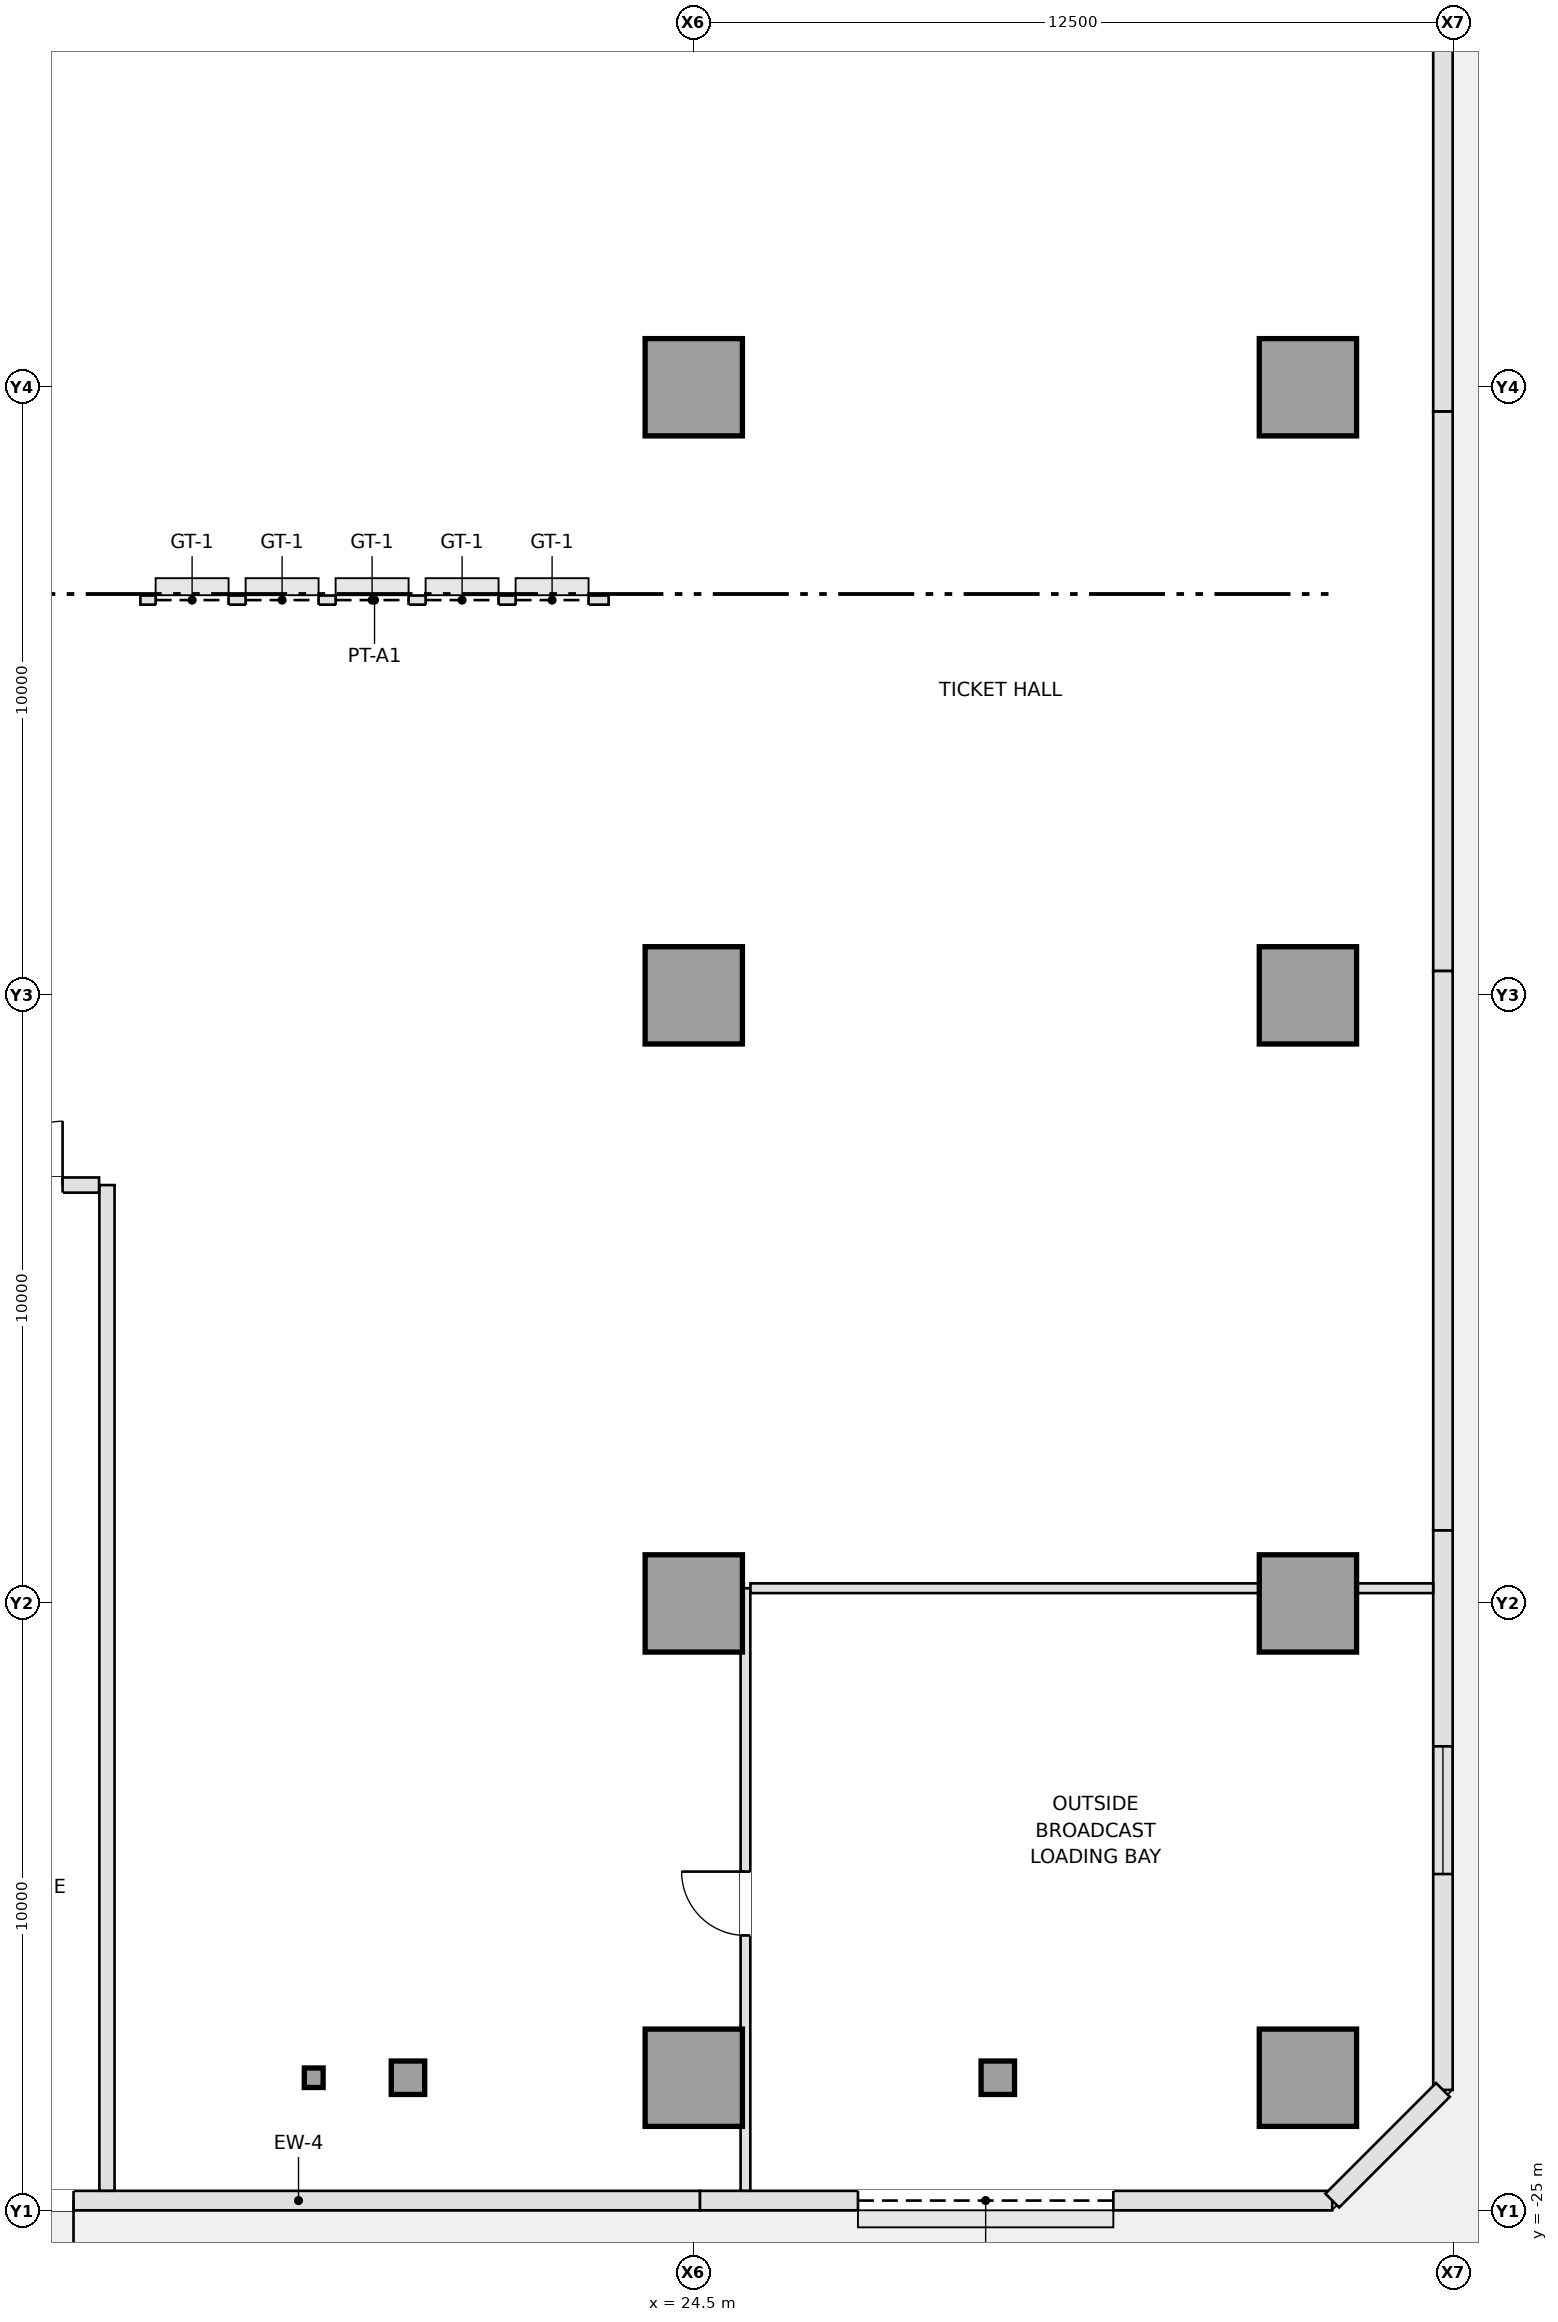
"""IFC4 building model, lengths in metres.
Left out: names, types, materials, properties, quantities, classifications, styles, units other than length and angle.
Written with IfcOpenShell. Run it as: python <this file> out.ifc"""

import sys

from ifc_helpers import new_model, si_unit, direction, frame, frame_2d, origin, origin_2d, place, context, subcontext, project, spatial, rectangle, i_section, extrude, element, fill, save


model = new_model("IFC4")
c1 = context("Model", 3, precision=1e-05, world=origin(), true_north=direction((0.0, 1.0)))
c2 = subcontext(c1, "Body", "Model", "MODEL_VIEW")
j1 = project(units=[si_unit("LENGTHUNIT", "METRE"), si_unit("PLANEANGLEUNIT", "RADIAN")], contexts=[c1])
p1 = place(None, origin())
s1 = spatial("IfcSite", under=j1, at=p1, CompositionType="ELEMENT")
p2 = place(p1, origin())
s2 = spatial("IfcBuilding", under=s1, at=p2, CompositionType="ELEMENT")
p3 = place(p2, origin())
s3 = spatial("IfcBuildingStorey", under=s2, at=p3, CompositionType="ELEMENT", Elevation=0.0)
for number, where, z_axis, x_axis in (
    (1, (24.5, -22.8, 0.0), (0.0, 0.0, 1.0), (1.0, 0.0, 0.0)),
    (2, (34.6, -22.8, 0.0), (0.0, 0.0, 1.0), (1.0, 0.0, 0.0)),
    (3, (24.5, -15.0, 0.0), (0.0, 0.0, 1.0), (1.0, 0.0, 0.0)),
    (4, (34.6, -15.0, 0.0), (0.0, 0.0, 1.0), (1.0, 0.0, 0.0)),
    (5, (24.5, -5.0, 0.0), (0.0, 0.0, 1.0), (1.0, 0.0, 0.0)),
    (6, (34.6, -5.0, 0.0), (0.0, 0.0, 1.0), (1.0, 0.0, 0.0)),
    (7, (24.5, 5.0, 0.0), (0.0, 0.0, 1.0), (1.0, 0.0, 0.0)),
    (8, (34.6, 5.0, 0.0), (0.0, 0.0, 1.0), (1.0, 0.0, 0.0)),
):
    element("IfcColumn", number, at=place(p3, frame(where, z_axis=z_axis, x_axis=x_axis)), inside=s3, PredefinedType="COLUMN", context=c2, shape_type="SweptSolid", body=[
        extrude(rectangle(XDim=1.6, YDim=1.6, at=origin_2d()), origin(), (0.0, 0.0, 1.0), 5.0),
    ])
p4 = place(p3, frame((18.25, -22.8, 0.0), z_axis=(0.0, 0.0, 1.0), x_axis=(1.0, 0.0, 0.0)))
e9 = element("IfcColumn", 9, at=p4, inside=s3, PredefinedType="COLUMN", context=c2, shape_type="SweptSolid", body=[
    extrude(i_section(OverallWidth=0.309, OverallDepth=0.321, WebThickness=0.014, FlangeThickness=0.022, FilletRadius=0.017, at=origin_2d()), origin(), (0.0, 0.0, 1.0), 5.0),
])
for number, where, z_axis, x_axis in (
    (10, (19.8, -22.8, 0.0), (0.0, 0.0, 1.0), (1.0, 0.0, 0.0)),
    (11, (29.5, -22.8, 0.0), (0.0, 0.0, 1.0), (1.0, 0.0, 0.0)),
):
    element("IfcColumn", number, at=place(p3, frame(where, z_axis=z_axis, x_axis=x_axis)), inside=s3, PredefinedType="PILASTER", context=c2, shape_type="SweptSolid", body=[
        extrude(rectangle(XDim=0.55, YDim=0.55, at=origin_2d()), origin(), (0.0, 0.0, 1.0), 5.0),
    ])
p5 = place(p3, frame((35.0, -24.82, 0.0), z_axis=(0.0, 0.0, 1.0), x_axis=(-1.0, 0.0, 0.0)))
e12 = element("IfcWall", 12, at=p5, inside=s3, PredefinedType="STANDARD", context=c2, shape_type="SweptSolid", body=[
    extrude(rectangle(XDim=10.4, YDim=0.32, at=frame_2d((5.2, 0.0))), origin(), (0.0, 0.0, 1.0), 4.7),
])
p6 = place(p5, frame((3.6, 0.0, 0.0)))
e13 = element("IfcOpeningElement", 13, at=p6, cuts=e12, PredefinedType="OPENING", context=c2, shape_type="SweptSolid", body=[
    extrude(rectangle(XDim=4.2, YDim=4.2, at=frame_2d((2.1, 2.1))), frame((0.0, 0.17, 0.0), z_axis=(0.0, -1.0, 0.0), x_axis=(1.0, 0.0, 0.0)), (0.0, 0.0, 1.0), 0.34),
])
p7 = place(p3, frame((24.6, -24.82, 0.0), z_axis=(0.0, 0.0, 1.0), x_axis=(-1.0, 0.0, 0.0)))
e14 = element("IfcWall", 14, at=p7, inside=s3, PredefinedType="STANDARD", context=c2, shape_type="SweptSolid", body=[
    extrude(rectangle(XDim=13.2, YDim=0.32, at=frame_2d((6.6, 0.0))), origin(), (0.0, 0.0, 1.0), 4.7),
])
p8 = place(p7, frame((10.3, 0.0, 0.0)))
e15 = element("IfcOpeningElement", 15, at=p8, cuts=e14, PredefinedType="OPENING", context=c2, shape_type="SweptSolid", body=[
    extrude(rectangle(XDim=1.1, YDim=2.2, at=frame_2d((0.55, 1.1))), frame((0.0, 0.17, 0.0), z_axis=(0.0, -1.0, 0.0), x_axis=(1.0, 0.0, 0.0)), (0.0, 0.0, 1.0), 0.34),
])
p9 = place(p3, frame((36.82, 13.8, 0.0), z_axis=(0.0, 0.0, 1.0), x_axis=(0.0, -1.0, 0.0)))
e16 = element("IfcWall", 16, at=p9, inside=s3, PredefinedType="STANDARD", context=c2, shape_type="SweptSolid", body=[
    extrude(rectangle(XDim=9.2, YDim=0.32, at=frame_2d((4.6, 0.0))), origin(), (0.0, 0.0, 1.0), 4.7),
])
p10 = place(p3, frame((36.82, 4.6, 0.0), z_axis=(0.0, 0.0, 1.0), x_axis=(0.0, -1.0, 0.0)))
e17 = element("IfcWall", 17, at=p10, inside=s3, PredefinedType="STANDARD", context=c2, shape_type="SweptSolid", body=[
    extrude(rectangle(XDim=9.2, YDim=0.32, at=frame_2d((4.6, 0.0))), origin(), (0.0, 0.0, 1.0), 4.7),
])
p11 = place(p3, frame((36.82, -4.6, 0.0), z_axis=(0.0, 0.0, 1.0), x_axis=(0.0, -1.0, 0.0)))
e18 = element("IfcWall", 18, at=p11, inside=s3, PredefinedType="STANDARD", context=c2, shape_type="SweptSolid", body=[
    extrude(rectangle(XDim=9.2, YDim=0.32, at=frame_2d((4.6, 0.0))), origin(), (0.0, 0.0, 1.0), 4.7),
])
p12 = place(p3, frame((36.82, -13.8, 0.0), z_axis=(0.0, 0.0, 1.0), x_axis=(0.0, -1.0, 0.0)))
e19 = element("IfcWall", 19, at=p12, inside=s3, PredefinedType="STANDARD", context=c2, shape_type="SweptSolid", body=[
    extrude(rectangle(XDim=9.2, YDim=0.32, at=frame_2d((4.6, 0.0))), origin(), (0.0, 0.0, 1.0), 4.7),
])
p13 = place(p12, frame((3.55, 0.0, 1.1)))
e20 = element("IfcOpeningElement", 20, at=p13, cuts=e19, PredefinedType="OPENING", context=c2, shape_type="SweptSolid", body=[
    extrude(rectangle(XDim=2.1, YDim=2.4, at=frame_2d((1.05, 1.2))), frame((0.0, 0.17, 0.0), z_axis=(0.0, -1.0, 0.0), x_axis=(1.0, 0.0, 0.0)), (0.0, 0.0, 1.0), 0.34),
])
p14 = place(p3, frame((36.82, -23.0, 0.0), z_axis=(0.0, 0.0, 1.0), x_axis=(-0.707106781187, -0.707106781187, 0.0)))
e21 = element("IfcWall", 21, at=p14, inside=s3, PredefinedType="STANDARD", context=c2, shape_type="SweptSolid", body=[
    extrude(rectangle(XDim=2.574, YDim=0.32, at=frame_2d((1.287, 0.0))), origin(), (0.0, 0.0, 1.0), 4.7),
])
p15 = place(p3, frame((14.85, -24.658, 0.0), z_axis=(0.0, 0.0, 1.0), x_axis=(0.0, 1.0, 0.0)))
e22 = element("IfcWall", 22, at=p15, inside=s3, PredefinedType="PARTITIONING", context=c2, shape_type="SweptSolid", body=[
    extrude(rectangle(XDim=16.538, YDim=0.25, at=frame_2d((8.269, 0.0))), origin(), (0.0, 0.0, 1.0), 4.7),
])
p16 = place(p3, frame((12.607, -8.12, 0.0), z_axis=(0.0, 0.0, 1.0), x_axis=(1.0, 0.0, 0.0)))
e23 = element("IfcWall", 23, at=p16, inside=s3, PredefinedType="PARTITIONING", context=c2, shape_type="SweptSolid", body=[
    extrude(rectangle(XDim=2.113, YDim=0.25, at=frame_2d((1.057, 0.0))), origin(), (0.0, 0.0, 1.0), 4.7),
])
p17 = place(p16, frame((0.463, 0.0, 0.0)))
e24 = element("IfcOpeningElement", 24, at=p17, cuts=e23, PredefinedType="OPENING", context=c2, shape_type="SweptSolid", body=[
    extrude(rectangle(XDim=1.05, YDim=2.15, at=frame_2d((0.525, 1.075))), frame((0.0, 0.135, 0.0), z_axis=(0.0, -1.0, 0.0), x_axis=(1.0, 0.0, 0.0)), (0.0, 0.0, 1.0), 0.27),
])
p18 = place(p3, frame((25.35, -24.658, 0.0), z_axis=(0.0, 0.0, 1.0), x_axis=(0.0, 1.0, 0.0)))
e25 = element("IfcWall", 25, at=p18, inside=s3, PredefinedType="PARTITIONING", context=c2, shape_type="SweptSolid", body=[
    extrude(rectangle(XDim=9.908, YDim=0.16, at=frame_2d((4.954, 0.0))), origin(), (0.0, 0.0, 1.0), 4.7),
])
p19 = place(p18, frame((4.198, 0.0, 0.0)))
e26 = element("IfcOpeningElement", 26, at=p19, cuts=e25, PredefinedType="OPENING", context=c2, shape_type="SweptSolid", body=[
    extrude(rectangle(XDim=1.05, YDim=2.12, at=frame_2d((0.525, 1.06))), frame((0.0, 0.09, 0.0), z_axis=(0.0, -1.0, 0.0), x_axis=(1.0, 0.0, 0.0)), (0.0, 0.0, 1.0), 0.18),
])
p20 = place(p3, frame((25.432, -14.75, 0.0), z_axis=(0.0, 0.0, 1.0), x_axis=(1.0, 0.0, 0.0)))
e27 = element("IfcWall", 27, at=p20, inside=s3, PredefinedType="PARTITIONING", context=c2, shape_type="SweptSolid", body=[
    extrude(rectangle(XDim=8.366, YDim=0.16, at=frame_2d((4.183, 0.0))), origin(), (0.0, 0.0, 1.0), 3.676),
])
p21 = place(p3, frame((35.402, -14.75, 0.0), z_axis=(0.0, 0.0, 1.0), x_axis=(1.0, 0.0, 0.0)))
e28 = element("IfcWall", 28, at=p21, inside=s3, PredefinedType="PARTITIONING", context=c2, shape_type="SweptSolid", body=[
    extrude(rectangle(XDim=1.258, YDim=0.16, at=frame_2d((0.629, 0.0))), origin(), (0.0, 0.0, 1.0), 4.7),
])
p22 = place(p3, frame((15.4, 1.5, 0.0), z_axis=(0.0, 0.0, 1.0), x_axis=(1.0, 0.0, 0.0)))
e29 = element("IfcWall", 29, at=p22, inside=s3, PredefinedType="PARTITIONING", context=c2, shape_type="SweptSolid", body=[
    extrude(rectangle(XDim=7.7, YDim=0.15, at=frame_2d((3.85, 0.0))), origin(), (0.0, 0.0, 1.0), 3.0),
])
p23 = place(p22, frame((0.25, 0.0, 0.0)))
e30 = element("IfcOpeningElement", 30, at=p23, cuts=e29, PredefinedType="OPENING", context=c2, shape_type="SweptSolid", body=[
    extrude(rectangle(XDim=1.2, YDim=2.1, at=frame_2d((0.6, 1.05))), frame((0.0, 0.085, 0.0), z_axis=(0.0, -1.0, 0.0), x_axis=(1.0, 0.0, 0.0)), (0.0, 0.0, 1.0), 0.17),
])
p24 = place(p22, frame((1.73, 0.0, 0.0)))
e31 = element("IfcOpeningElement", 31, at=p24, cuts=e29, PredefinedType="OPENING", context=c2, shape_type="SweptSolid", body=[
    extrude(rectangle(XDim=1.2, YDim=2.1, at=frame_2d((0.6, 1.05))), frame((0.0, 0.085, 0.0), z_axis=(0.0, -1.0, 0.0), x_axis=(1.0, 0.0, 0.0)), (0.0, 0.0, 1.0), 0.17),
])
p25 = place(p22, frame((3.21, 0.0, 0.0)))
e32 = element("IfcOpeningElement", 32, at=p25, cuts=e29, PredefinedType="OPENING", context=c2, shape_type="SweptSolid", body=[
    extrude(rectangle(XDim=1.2, YDim=2.1, at=frame_2d((0.6, 1.05))), frame((0.0, 0.085, 0.0), z_axis=(0.0, -1.0, 0.0), x_axis=(1.0, 0.0, 0.0)), (0.0, 0.0, 1.0), 0.17),
])
p26 = place(p22, frame((4.69, 0.0, 0.0)))
e33 = element("IfcOpeningElement", 33, at=p26, cuts=e29, PredefinedType="OPENING", context=c2, shape_type="SweptSolid", body=[
    extrude(rectangle(XDim=1.2, YDim=2.1, at=frame_2d((0.6, 1.05))), frame((0.0, 0.085, 0.0), z_axis=(0.0, -1.0, 0.0), x_axis=(1.0, 0.0, 0.0)), (0.0, 0.0, 1.0), 0.17),
])
p27 = place(p22, frame((6.17, 0.0, 0.0)))
e34 = element("IfcOpeningElement", 34, at=p27, cuts=e29, PredefinedType="OPENING", context=c2, shape_type="SweptSolid", body=[
    extrude(rectangle(XDim=1.2, YDim=2.1, at=frame_2d((0.6, 1.05))), frame((0.0, 0.085, 0.0), z_axis=(0.0, -1.0, 0.0), x_axis=(1.0, 0.0, 0.0)), (0.0, 0.0, 1.0), 0.17),
])
p28 = place(p6, origin())
e35 = element("IfcDoor", 35, at=p28, inside=s3, OperationType="ROLLINGUP", PredefinedType="GATE", context=c2, shape_type="SweptSolid", body=[
    extrude(rectangle(XDim=4.2, YDim=4.2, at=frame_2d((2.1, 2.1))), frame((0.0, 0.025, 0.0), z_axis=(0.0, -1.0, 0.0), x_axis=(1.0, 0.0, 0.0)), (0.0, 0.0, 1.0), 0.05),
])
fill(e13, e35)
p29 = place(p8, origin())
e36 = element("IfcDoor", 36, at=p29, inside=s3, OperationType="SINGLE_SWING_LEFT", PredefinedType="DOOR", context=c2, shape_type="SweptSolid", body=[
    extrude(rectangle(XDim=1.1, YDim=2.2, at=frame_2d((0.55, 1.1))), frame((0.0, 0.025, 0.0), z_axis=(0.0, -1.0, 0.0), x_axis=(1.0, 0.0, 0.0)), (0.0, 0.0, 1.0), 0.05),
])
fill(e15, e36)
p30 = place(p13, origin())
e37 = element("IfcWindow", 37, at=p30, inside=s3, PartitioningType="SINGLE_PANEL", PredefinedType="WINDOW", context=c2, shape_type="SweptSolid", body=[
    extrude(rectangle(XDim=2.1, YDim=2.4, at=frame_2d((1.05, 1.2))), frame((0.0, 0.03, 0.0), z_axis=(0.0, -1.0, 0.0), x_axis=(1.0, 0.0, 0.0)), (0.0, 0.0, 1.0), 0.06),
])
fill(e20, e37)
p31 = place(p17, origin())
e38 = element("IfcDoor", 38, at=p31, inside=s3, OperationType="SINGLE_SWING_RIGHT", PredefinedType="DOOR", context=c2, shape_type="SweptSolid", body=[
    extrude(rectangle(XDim=1.05, YDim=2.15, at=frame_2d((0.525, 1.075))), frame((0.0, 0.025, 0.0), z_axis=(0.0, -1.0, 0.0), x_axis=(1.0, 0.0, 0.0)), (0.0, 0.0, 1.0), 0.05),
])
fill(e24, e38)
p32 = place(p19, origin())
e39 = element("IfcDoor", 39, at=p32, inside=s3, OperationType="SINGLE_SWING_RIGHT", PredefinedType="DOOR", context=c2, shape_type="SweptSolid", body=[
    extrude(rectangle(XDim=1.05, YDim=2.12, at=frame_2d((0.525, 1.06))), frame((0.0, 0.025, 0.0), z_axis=(0.0, -1.0, 0.0), x_axis=(1.0, 0.0, 0.0)), (0.0, 0.0, 1.0), 0.05),
])
fill(e26, e39)
p33 = place(p23, origin())
e40 = element("IfcDoor", 40, at=p33, inside=s3, OperationType="DOUBLE_DOOR_SINGLE_SWING", PredefinedType="GATE", context=c2, shape_type="SweptSolid", body=[
    extrude(rectangle(XDim=1.2, YDim=2.1, at=frame_2d((0.6, 1.05))), frame((0.0, 0.025, 0.0), z_axis=(0.0, -1.0, 0.0), x_axis=(1.0, 0.0, 0.0)), (0.0, 0.0, 1.0), 0.05),
])
fill(e30, e40)
p34 = place(p24, origin())
e41 = element("IfcDoor", 41, at=p34, inside=s3, OperationType="DOUBLE_DOOR_SINGLE_SWING", PredefinedType="GATE", context=c2, shape_type="SweptSolid", body=[
    extrude(rectangle(XDim=1.2, YDim=2.1, at=frame_2d((0.6, 1.05))), frame((0.0, 0.025, 0.0), z_axis=(0.0, -1.0, 0.0), x_axis=(1.0, 0.0, 0.0)), (0.0, 0.0, 1.0), 0.05),
])
fill(e31, e41)
p35 = place(p25, origin())
e42 = element("IfcDoor", 42, at=p35, inside=s3, OperationType="DOUBLE_DOOR_SINGLE_SWING", PredefinedType="GATE", context=c2, shape_type="SweptSolid", body=[
    extrude(rectangle(XDim=1.2, YDim=2.1, at=frame_2d((0.6, 1.05))), frame((0.0, 0.025, 0.0), z_axis=(0.0, -1.0, 0.0), x_axis=(1.0, 0.0, 0.0)), (0.0, 0.0, 1.0), 0.05),
])
fill(e32, e42)
p36 = place(p26, origin())
e43 = element("IfcDoor", 43, at=p36, inside=s3, OperationType="DOUBLE_DOOR_SINGLE_SWING", PredefinedType="GATE", context=c2, shape_type="SweptSolid", body=[
    extrude(rectangle(XDim=1.2, YDim=2.1, at=frame_2d((0.6, 1.05))), frame((0.0, 0.025, 0.0), z_axis=(0.0, -1.0, 0.0), x_axis=(1.0, 0.0, 0.0)), (0.0, 0.0, 1.0), 0.05),
])
fill(e33, e43)
p37 = place(p27, origin())
e44 = element("IfcDoor", 44, at=p37, inside=s3, OperationType="DOUBLE_DOOR_SINGLE_SWING", PredefinedType="GATE", context=c2, shape_type="SweptSolid", body=[
    extrude(rectangle(XDim=1.2, YDim=2.1, at=frame_2d((0.6, 1.05))), frame((0.0, 0.025, 0.0), z_axis=(0.0, -1.0, 0.0), x_axis=(1.0, 0.0, 0.0)), (0.0, 0.0, 1.0), 0.05),
])
fill(e34, e44)
save(model, sys.argv[1])
